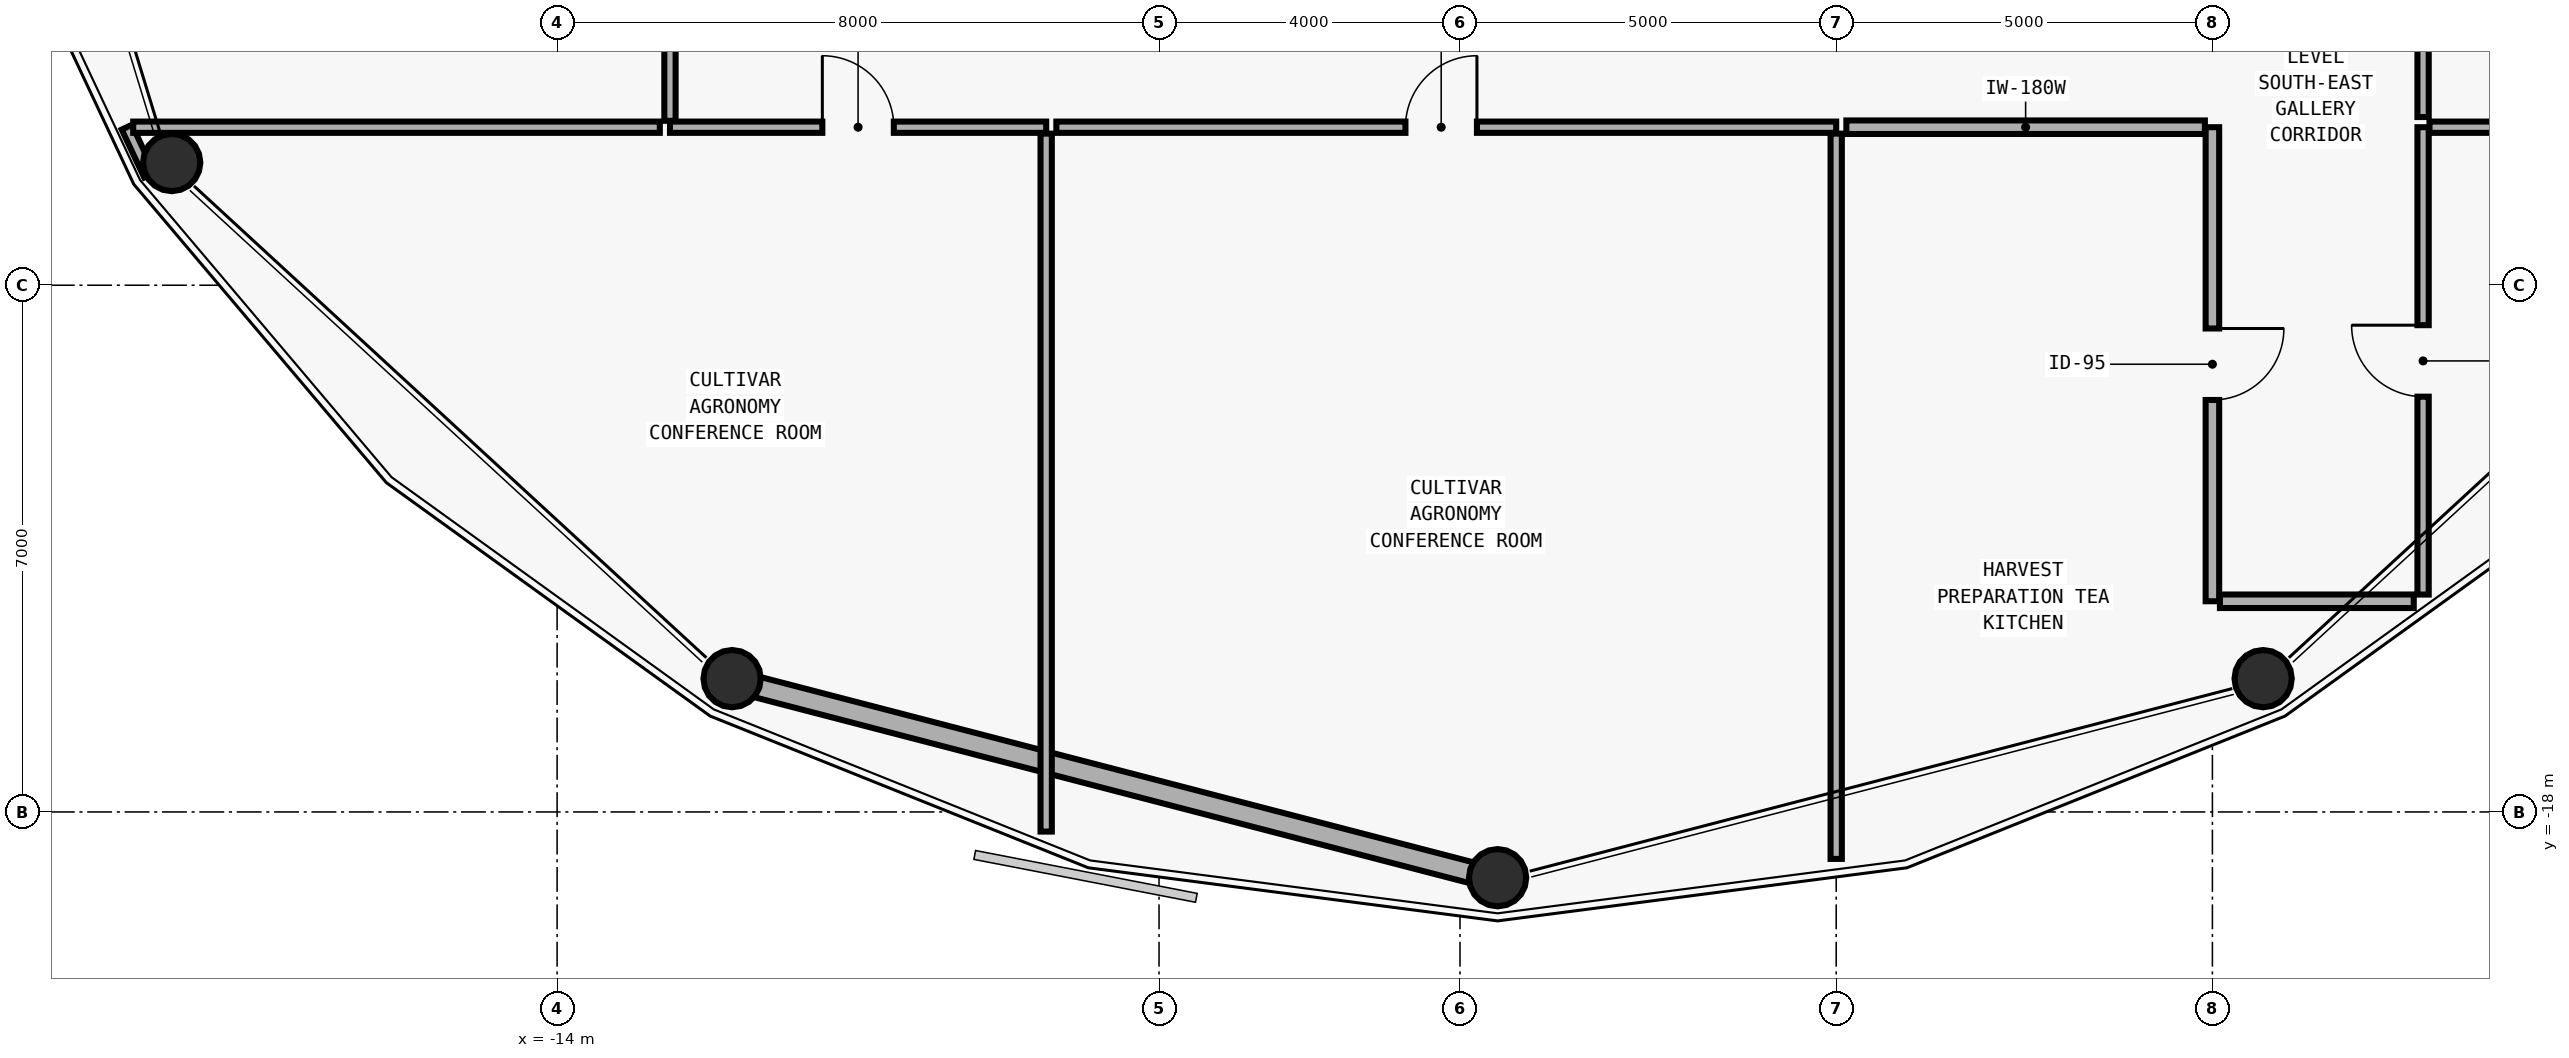
"""IFC4 building model, lengths in metres.
Left out: names, types, materials, properties, quantities, classifications, styles, units other than length and angle.
Written with IfcOpenShell. Run it as: python <this file> out.ifc"""

import sys

from ifc_helpers import new_model, si_unit, direction, frame, frame_2d, origin, origin_2d, place, context, subcontext, project, spatial, rectangle, hollow_circle, extrude, element, fill, save


model = new_model("IFC4")
c1 = context("Model", 3, precision=1e-05, world=origin(), true_north=direction((0.0, 1.0)))
c2 = subcontext(c1, "Body", "Model", "MODEL_VIEW")
j1 = project(units=[si_unit("LENGTHUNIT", "METRE"), si_unit("PLANEANGLEUNIT", "RADIAN")], contexts=[c1])
p1 = place(None, origin())
s1 = spatial("IfcSite", under=j1, at=p1, CompositionType="ELEMENT")
p2 = place(p1, origin())
s2 = spatial("IfcBuilding", under=s1, at=p2, CompositionType="ELEMENT")
p3 = place(p2, frame((0.0, 0.0, 165.6)))
s3 = spatial("IfcBuildingStorey", under=s2, at=p3, CompositionType="ELEMENT", Elevation=165.6)
for number, where, z_axis, x_axis in (
    (1, (-19.151, -9.382, 0.0), (0.017, 0.007, 1.0), (-0.384, 0.923, 0.0)),
    (2, (-11.691, -16.249, 0.0), (0.01, 0.012, 1.0), (-0.779, 0.627, 0.0)),
):
    element("IfcColumn", number, at=place(p3, frame(where, z_axis=z_axis, x_axis=x_axis)), inside=s3, PredefinedType="COLUMN", context=c2, shape_type="SweptSolid", body=[
        extrude(hollow_circle(Radius=0.381, WallThickness=0.028, at=origin_2d()), origin(), (0.0, 0.0, 1.0), 3.45),
    ])
p4 = place(p3, frame((-1.5, -18.898, 0.0), z_axis=(0.0, 0.013868880419, 0.999903822453), x_axis=(-1.0, 0.0, 0.0)))
e3 = element("IfcColumn", 3, at=p4, inside=s3, PredefinedType="COLUMN", context=c2, shape_type="SweptSolid", body=[
    extrude(hollow_circle(Radius=0.381, WallThickness=0.028, at=origin_2d()), origin(), (0.0, 0.0, 1.0), 3.45),
])
p5 = place(p3, frame((8.691, -16.249, 0.0), z_axis=(-0.009693839824, 0.012028852336, 0.99988066097), x_axis=(-0.77862958397, -0.627483841199, 0.0)))
e4 = element("IfcColumn", 4, at=p5, inside=s3, PredefinedType="COLUMN", context=c2, shape_type="SweptSolid", body=[
    extrude(hollow_circle(Radius=0.381, WallThickness=0.028, at=origin_2d()), origin(), (0.0, 0.0, 1.0), 3.45),
])
p6 = place(p3, frame((-1.825, -18.813, 0.0), z_axis=(0.0, 0.0, 1.0), x_axis=(-0.967842287651, 0.251557759242, 0.0)))
e5 = element("IfcWall", 5, at=p6, inside=s3, PredefinedType="SOLIDWALL", context=c2, shape_type="SweptSolid", body=[
    extrude(rectangle(XDim=9.857, YDim=0.28, at=frame_2d((4.929, 0.0))), origin(), (0.0, 0.0, 1.0), 2.97),
])
p7 = place(p3, frame((-12.5, -8.9, 0.0), z_axis=(0.0, 0.0, 1.0), x_axis=(1.0, 0.0, 0.0)))
e6 = element("IfcWall", 6, at=p7, inside=s3, PredefinedType="PARTITIONING", context=c2, shape_type="SweptSolid", body=[
    extrude(rectangle(XDim=5.0, YDim=0.15, at=frame_2d((2.5, 0.0))), origin(), (0.0, 0.0, 1.0), 2.882),
])
p8 = place(p7, frame((2.025, 0.0, 0.0)))
e7 = element("IfcOpeningElement", 7, at=p8, cuts=e6, PredefinedType="OPENING", context=c2, shape_type="SweptSolid", body=[
    extrude(rectangle(XDim=0.95, YDim=2.1, at=frame_2d((0.475, 1.05))), frame((0.0, 0.085, 0.0), z_axis=(0.0, -1.0, 0.0), x_axis=(1.0, 0.0, 0.0)), (0.0, 0.0, 1.0), 0.17),
])
p9 = place(p3, frame((-7.365, -8.9, 0.0), z_axis=(0.0, 0.0, 1.0), x_axis=(1.0, 0.0, 0.0)))
e8 = element("IfcWall", 8, at=p9, inside=s3, PredefinedType="PARTITIONING", context=c2, shape_type="SweptSolid", body=[
    extrude(rectangle(XDim=10.365, YDim=0.15, at=frame_2d((5.183, 0.0))), origin(), (0.0, 0.0, 1.0), 3.45),
])
p10 = place(p9, frame((4.64, 0.0, 0.0)))
e9 = element("IfcOpeningElement", 9, at=p10, cuts=e8, PredefinedType="OPENING", context=c2, shape_type="SweptSolid", body=[
    extrude(rectangle(XDim=0.95, YDim=2.1, at=frame_2d((0.475, 1.05))), frame((0.0, 0.085, 0.0), z_axis=(0.0, -1.0, 0.0), x_axis=(1.0, 0.0, 0.0)), (0.0, 0.0, 1.0), 0.17),
])
p11 = place(p3, frame((8.0, -8.9, 0.0), z_axis=(0.0, 0.0, 1.0), x_axis=(0.0, -1.0, 0.0)))
e10 = element("IfcWall", 10, at=p11, inside=s3, PredefinedType="PLUMBINGWALL", context=c2, shape_type="SweptSolid", body=[
    extrude(rectangle(XDim=6.3, YDim=0.18, at=frame_2d((3.15, 0.0))), origin(), (0.0, 0.0, 1.0), 2.882),
])
p12 = place(p11, frame((2.675, 0.0, 0.0)))
e11 = element("IfcOpeningElement", 11, at=p12, cuts=e10, PredefinedType="OPENING", context=c2, shape_type="SweptSolid", body=[
    extrude(rectangle(XDim=0.95, YDim=2.1, at=frame_2d((0.475, 1.05))), frame((0.0, 0.1, 0.0), z_axis=(0.0, -1.0, 0.0), x_axis=(1.0, 0.0, 0.0)), (0.0, 0.0, 1.0), 0.2),
])
p13 = place(p3, frame((10.8, -15.111, 0.0), z_axis=(0.0, 0.0, 1.0), x_axis=(0.0, 1.0, 0.0)))
e12 = element("IfcWall", 12, at=p13, inside=s3, PredefinedType="PARTITIONING", context=c2, shape_type="SweptSolid", body=[
    extrude(rectangle(XDim=6.211, YDim=0.15, at=frame_2d((3.105, 0.0))), origin(), (0.0, 0.0, 1.0), 3.45),
])
p14 = place(p13, frame((2.63, 0.0, 0.0)))
e13 = element("IfcOpeningElement", 13, at=p14, cuts=e12, PredefinedType="OPENING", context=c2, shape_type="SweptSolid", body=[
    extrude(rectangle(XDim=0.95, YDim=2.1, at=frame_2d((0.475, 1.05))), frame((0.0, 0.085, 0.0), z_axis=(0.0, -1.0, 0.0), x_axis=(1.0, 0.0, 0.0)), (0.0, 0.0, 1.0), 0.17),
])
p15 = place(p3, frame((-7.5, -8.985, 0.0), z_axis=(0.0, 0.0, 1.0), x_axis=(0.0, -1.0, 0.0)))
e14 = element("IfcWall", 14, at=p15, inside=s3, PredefinedType="PARTITIONING", context=c2, shape_type="SweptSolid", body=[
    extrude(rectangle(XDim=9.276, YDim=0.15, at=frame_2d((4.638, 0.0))), origin(), (0.0, 0.0, 1.0), 3.45),
])
p16 = place(p3, frame((-19.42, -9.537, 0.0), z_axis=(0.0, 0.0, 1.0), x_axis=(-0.424878134875, 0.905250556755, 0.0)))
e15 = element("IfcWall", 15, at=p16, inside=s3, PredefinedType="PARTITIONING", context=c2, shape_type="SweptSolid", body=[
    extrude(rectangle(XDim=0.704, YDim=0.15, at=frame_2d((0.352, 0.0))), origin(), (0.0, 0.0, 1.0), 2.982),
])
p17 = place(p3, frame((-19.634, -8.9, 0.0), z_axis=(0.0, 0.0, 1.0), x_axis=(1.0, 0.0, 0.0)))
e16 = element("IfcWall", 16, at=p17, inside=s3, PredefinedType="PARTITIONING", context=c2, shape_type="SweptSolid", body=[
    extrude(rectangle(XDim=6.999, YDim=0.15, at=frame_2d((3.5, 0.0))), origin(), (0.0, 0.0, 1.0), 2.882),
])
p18 = place(p3, frame((3.0, -8.985, 0.0), z_axis=(0.0, 0.0, 1.0), x_axis=(0.0, -1.0, 0.0)))
e17 = element("IfcWall", 17, at=p18, inside=s3, PredefinedType="PARTITIONING", context=c2, shape_type="SweptSolid", body=[
    extrude(rectangle(XDim=9.639, YDim=0.15, at=frame_2d((4.819, 0.0))), origin(), (0.0, 0.0, 1.0), 3.45),
])
p19 = place(p3, frame((3.135, -8.9, 0.0), z_axis=(0.0, 0.0, 1.0), x_axis=(1.0, 0.0, 0.0)))
e18 = element("IfcWall", 18, at=p19, inside=s3, PredefinedType="PLUMBINGWALL", context=c2, shape_type="SweptSolid", body=[
    extrude(rectangle(XDim=4.765, YDim=0.18, at=frame_2d((2.382, 0.0))), origin(), (0.0, 0.0, 1.0), 3.45),
])
p20 = place(p3, frame((8.1, -15.2, 0.0), z_axis=(0.0, 0.0, 1.0), x_axis=(1.0, 0.0, 0.0)))
e19 = element("IfcWall", 19, at=p20, inside=s3, PredefinedType="PLUMBINGWALL", context=c2, shape_type="SweptSolid", body=[
    extrude(rectangle(XDim=2.576, YDim=0.18, at=frame_2d((1.288, 0.0))), origin(), (0.0, 0.0, 1.0), 3.45),
])
p21 = place(p3, frame((10.885, -8.9, 0.0), z_axis=(0.0, 0.0, 1.0), x_axis=(1.0, 0.0, 0.0)))
e20 = element("IfcWall", 20, at=p21, inside=s3, PredefinedType="PARTITIONING", context=c2, shape_type="SweptSolid", body=[
    extrude(rectangle(XDim=5.834, YDim=0.15, at=frame_2d((2.917, 0.0))), origin(), (0.0, 0.0, 1.0), 2.882),
])
p22 = place(p3, frame((-12.5, -6.685, 0.0), z_axis=(0.0, 0.0, 1.0), x_axis=(0.0, -1.0, 0.0)))
e21 = element("IfcWall", 21, at=p22, inside=s3, PredefinedType="PARTITIONING", context=c2, shape_type="SweptSolid", body=[
    extrude(rectangle(XDim=2.13, YDim=0.15, at=frame_2d((1.065, 0.0))), origin(), (0.0, 0.0, 1.0), 3.45),
])
p23 = place(p3, frame((10.8, -8.765, 0.0), z_axis=(0.0, 0.0, 1.0), x_axis=(0.0, 1.0, 0.0)))
e22 = element("IfcWall", 22, at=p23, inside=s3, PredefinedType="PARTITIONING", context=c2, shape_type="SweptSolid", body=[
    extrude(rectangle(XDim=2.03, YDim=0.15, at=frame_2d((1.015, 0.0))), origin(), (0.0, 0.0, 1.0), 3.45),
])
p24 = place(p8, origin())
e23 = element("IfcDoor", 23, at=p24, inside=s3, OperationType="SINGLE_SWING_LEFT", PredefinedType="DOOR", context=c2, shape_type="SweptSolid", body=[
    extrude(rectangle(XDim=0.95, YDim=2.1, at=frame_2d((0.475, 1.05))), frame((0.0, 0.025, 0.0), z_axis=(0.0, -1.0, 0.0), x_axis=(1.0, 0.0, 0.0)), (0.0, 0.0, 1.0), 0.05),
])
fill(e7, e23)
p25 = place(p10, origin())
e24 = element("IfcDoor", 24, at=p25, inside=s3, OperationType="SINGLE_SWING_RIGHT", PredefinedType="DOOR", context=c2, shape_type="SweptSolid", body=[
    extrude(rectangle(XDim=0.95, YDim=2.1, at=frame_2d((0.475, 1.05))), frame((0.0, 0.025, 0.0), z_axis=(0.0, -1.0, 0.0), x_axis=(1.0, 0.0, 0.0)), (0.0, 0.0, 1.0), 0.05),
])
fill(e9, e24)
p26 = place(p12, origin())
e25 = element("IfcDoor", 25, at=p26, inside=s3, OperationType="SINGLE_SWING_LEFT", PredefinedType="DOOR", context=c2, shape_type="SweptSolid", body=[
    extrude(rectangle(XDim=0.95, YDim=2.1, at=frame_2d((0.475, 1.05))), frame((0.0, 0.025, 0.0), z_axis=(0.0, -1.0, 0.0), x_axis=(1.0, 0.0, 0.0)), (0.0, 0.0, 1.0), 0.05),
])
fill(e11, e25)
p27 = place(p14, origin())
e26 = element("IfcDoor", 26, at=p27, inside=s3, OperationType="SINGLE_SWING_RIGHT", PredefinedType="DOOR", context=c2, shape_type="SweptSolid", body=[
    extrude(rectangle(XDim=0.95, YDim=2.1, at=frame_2d((0.475, 1.05))), frame((0.0, 0.025, 0.0), z_axis=(0.0, -1.0, 0.0), x_axis=(1.0, 0.0, 0.0)), (0.0, 0.0, 1.0), 0.05),
])
fill(e13, e26)
save(model, sys.argv[1])
